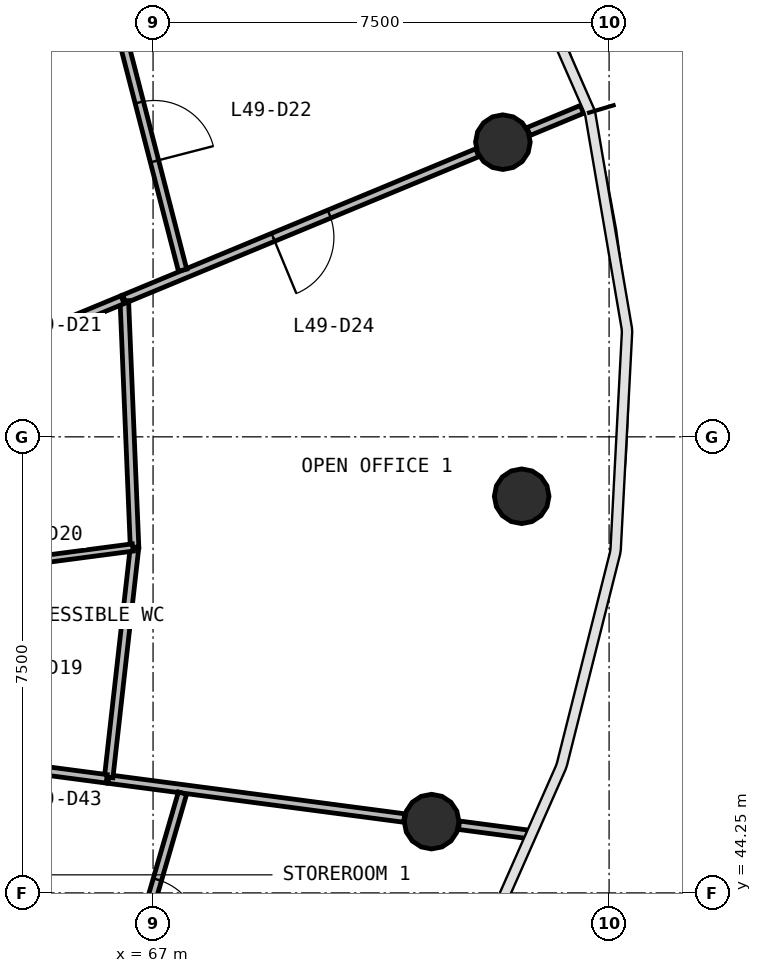
"""IFC4 building model, lengths in metres.
Left out: names, types, materials, properties, quantities, classifications, styles, units other than length and angle.
Written with IfcOpenShell. Run it as: python <this file> out.ifc"""

import sys

from ifc_helpers import new_model, si_unit, direction, frame, frame_2d, origin, origin_2d, place, context, subcontext, project, spatial, rectangle, circle, extrude, source, transform, mapped, element, fill, save


model = new_model("IFC4")
c1 = context("Model", 3, precision=1e-05, world=origin(), true_north=direction((0.0, 1.0)))
c2 = subcontext(c1, "Body", "Model", "MODEL_VIEW")
j1 = project(units=[si_unit("LENGTHUNIT", "METRE"), si_unit("PLANEANGLEUNIT", "RADIAN")], contexts=[c1])
p1 = place(None, origin())
s1 = spatial("IfcSite", under=j1, at=p1, CompositionType="ELEMENT")
p2 = place(p1, origin())
s2 = spatial("IfcBuilding", under=s1, at=p2, CompositionType="ELEMENT")
p3 = place(p2, frame((0.0, 0.0, 203.3)))
s3 = spatial("IfcBuildingStorey", under=s2, at=p3, CompositionType="ELEMENT", Elevation=203.3)
m1 = source(origin(), c2, "Body", "SweptSolid", [
    extrude(circle(Radius=0.45, at=origin_2d()), origin(), (0.0, 0.0, 1.0), 3.9),
])
for number, where, z_axis, x_axis in (
    (1, (73.062, 50.773, 0.0), (0.0, 0.0, 1.0), (1.0, 0.0, 0.0)),
    (2, (72.753, 56.596, 0.0), (0.0, 0.0, 1.0), (1.0, 0.0, 0.0)),
    (3, (71.581, 45.422, 0.0), (0.0, 0.0, 1.0), (1.0, 0.0, 0.0)),
):
    element("IfcColumn", number, at=place(p3, frame(where, z_axis=z_axis, x_axis=x_axis)), inside=s3, PredefinedType="COLUMN", context=c2, shape_type="MappedRepresentation", body=[
        mapped(m1, transform((0.0, 0.0, 0.0), scale=1.0)),
    ])
p4 = place(p3, frame((72.333, 56.422, 0.0), z_axis=(0.0, 0.0, 1.0), x_axis=(-0.92388853292, -0.382661702733, 0.0)))
e4 = element("IfcWall", 4, at=p4, inside=s3, PredefinedType="PARTITIONING", context=c2, shape_type="SweptSolid", body=[
    extrude(rectangle(XDim=6.285, YDim=0.14, at=frame_2d((3.143, 0.0))), origin(), (0.0, 0.0, 1.0), 2.88),
])
p5 = place(p4, frame((2.635, 0.0, 0.0)))
e5 = element("IfcOpeningElement", 5, at=p5, cuts=e4, PredefinedType="OPENING", context=c2, shape_type="SweptSolid", body=[
    extrude(rectangle(XDim=1.0, YDim=2.1, at=frame_2d((0.5, 1.05))), frame((0.0, 0.08, 0.0), z_axis=(0.0, -1.0, 0.0), x_axis=(1.0, 0.0, 0.0)), (0.0, 0.0, 1.0), 0.16),
])
p6 = place(p3, frame((66.267, 46.122, 0.0), z_axis=(0.0, 0.0, 1.0), x_axis=(0.991448195842, -0.130500861923, 0.0)))
e6 = element("IfcWall", 6, at=p6, inside=s3, PredefinedType="PARTITIONING", context=c2, shape_type="SweptSolid", body=[
    extrude(rectangle(XDim=4.905, YDim=0.14, at=frame_2d((2.453, 0.0))), origin(), (0.0, 0.0, 1.0), 2.88),
])
p7 = place(p3, frame((66.324, 58.991, 0.0), z_axis=(0.0, 0.0, 1.0), x_axis=(0.249819251726, -0.968292487561, 0.0)))
e7 = element("IfcWall", 7, at=p7, inside=s3, PredefinedType="PARTITIONING", context=c2, shape_type="SweptSolid", body=[
    extrude(rectangle(XDim=4.649, YDim=0.14, at=frame_2d((2.324, 0.0))), origin(), (0.0, 0.0, 1.0), 2.88),
])
p8 = place(p7, frame((1.799, 0.0, 0.0)))
e8 = element("IfcOpeningElement", 8, at=p8, cuts=e7, PredefinedType="OPENING", context=c2, shape_type="SweptSolid", body=[
    extrude(rectangle(XDim=1.0, YDim=2.1, at=frame_2d((0.5, 1.05))), frame((0.0, 0.08, 0.0), z_axis=(0.0, -1.0, 0.0), x_axis=(1.0, 0.0, 0.0)), (0.0, 0.0, 1.0), 0.16),
])
p9 = place(p3, frame((66.696, 49.935, 0.0), z_axis=(0.0, 0.0, 1.0), x_axis=(-0.041535399008, 0.999137032959, 0.0)))
e9 = element("IfcWall", 9, at=p9, inside=s3, PredefinedType="PARTITIONING", context=c2, shape_type="SweptSolid", body=[
    extrude(rectangle(XDim=4.056, YDim=0.14, at=frame_2d((2.028, 0.0))), origin(), (0.0, 0.0, 1.0), 2.88),
])
p10 = place(p3, frame((67.484, 45.891, 0.0), z_axis=(0.0, 0.0, 1.0), x_axis=(-0.279262901939, -0.960214679955, 0.0)))
e10 = element("IfcWall", 10, at=p10, inside=s3, PredefinedType="PARTITIONING", context=c2, shape_type="SweptSolid", body=[
    extrude(rectangle(XDim=3.931, YDim=0.14, at=frame_2d((1.965, 0.0))), origin(), (0.0, 0.0, 1.0), 2.88),
])
p11 = place(p10, frame((1.481, 0.0, 0.0)))
e11 = element("IfcOpeningElement", 11, at=p11, cuts=e10, PredefinedType="OPENING", context=c2, shape_type="SweptSolid", body=[
    extrude(rectangle(XDim=1.0, YDim=2.1, at=frame_2d((0.5, 1.05))), frame((0.0, 0.08, 0.0), z_axis=(0.0, -1.0, 0.0), x_axis=(1.0, 0.0, 0.0)), (0.0, 0.0, 1.0), 0.16),
])
p12 = place(p3, frame((66.271, 46.152, 0.0), z_axis=(0.0, 0.0, 1.0), x_axis=(0.111758070994, 0.993735444456, 0.0)))
e12 = element("IfcWall", 12, at=p12, inside=s3, PredefinedType="PARTITIONING", context=c2, shape_type="SweptSolid", body=[
    extrude(rectangle(XDim=3.777, YDim=0.14, at=frame_2d((1.889, 0.0))), origin(), (0.0, 0.0, 1.0), 2.88),
])
p13 = place(p3, frame((63.49, 52.759, 0.0), z_axis=(0.0, 0.0, 1.0), x_axis=(0.923862401464, 0.382724787753, 0.0)))
e13 = element("IfcWall", 13, at=p13, inside=s3, PredefinedType="PARTITIONING", context=c2, shape_type="SweptSolid", body=[
    extrude(rectangle(XDim=3.257, YDim=0.14, at=frame_2d((1.628, 0.0))), origin(), (0.0, 0.0, 1.0), 2.88),
])
p14 = place(p3, frame((63.49, 46.487, 0.0), z_axis=(0.0, 0.0, 1.0), x_axis=(0.991438994906, -0.13057074473, 0.0)))
e14 = element("IfcWall", 14, at=p14, inside=s3, PredefinedType="PARTITIONING", context=c2, shape_type="SweptSolid", body=[
    extrude(rectangle(XDim=2.771, YDim=0.14, at=frame_2d((1.385, 0.0))), origin(), (0.0, 0.0, 1.0), 2.88),
])
p15 = place(p3, frame((72.031, 45.363, 0.0), z_axis=(0.0, 0.0, 1.0), x_axis=(0.99143621724, -0.130591834141, 0.0)))
e15 = element("IfcWall", 15, at=p15, inside=s3, PredefinedType="PARTITIONING", context=c2, shape_type="SweptSolid", body=[
    extrude(rectangle(XDim=1.15, YDim=0.14, at=frame_2d((0.575, 0.0))), origin(), (0.0, 0.0, 1.0), 2.88),
])
p16 = place(p3, frame((73.174, 56.77, 0.0), z_axis=(0.0, 0.0, 1.0), x_axis=(0.923779659408, 0.38292445843, 0.0)))
e16 = element("IfcWall", 16, at=p16, inside=s3, PredefinedType="PARTITIONING", context=c2, shape_type="SweptSolid", body=[
    extrude(rectangle(XDim=0.954, YDim=0.14, at=frame_2d((0.477, 0.0))), origin(), (0.0, 0.0, 1.0), 2.88),
])
p17 = place(p3, frame((63.49, 49.513, 0.0), z_axis=(0.0, 0.0, 1.0), x_axis=(0.991442878973, 0.130541249168, 0.0)))
e17 = element("IfcWall", 17, at=p17, inside=s3, PredefinedType="PARTITIONING", context=c2, shape_type="SweptSolid", body=[
    extrude(rectangle(XDim=3.204, YDim=0.12, at=frame_2d((1.602, 0.0))), origin(), (0.0, 0.0, 1.0), 2.88),
])
m2 = source(origin(), c2, "Body", "SweptSolid", [
    extrude(rectangle(XDim=1.0, YDim=2.1, at=frame_2d((0.5, 1.05))), frame((0.0, 0.025, 0.0), z_axis=(0.0, -1.0, 0.0), x_axis=(1.0, 0.0, 0.0)), (0.0, 0.0, 1.0), 0.05),
])
p18 = place(p8, origin())
e18 = element("IfcDoor", 18, at=p18, inside=s3, OperationType="SINGLE_SWING_RIGHT", PredefinedType="DOOR", context=c2, shape_type="MappedRepresentation", body=[
    mapped(m2, transform((0.0, 0.0, 0.0), scale=1.0)),
])
fill(e8, e18)
p19 = place(p5, origin())
e19 = element("IfcDoor", 19, at=p19, inside=s3, OperationType="SINGLE_SWING_RIGHT", PredefinedType="DOOR", context=c2, shape_type="MappedRepresentation", body=[
    mapped(m2, transform((0.0, 0.0, 0.0), scale=1.0)),
])
fill(e5, e19)
p20 = place(p11, origin())
e20 = element("IfcDoor", 20, at=p20, inside=s3, OperationType="SINGLE_SWING_RIGHT", PredefinedType="DOOR", context=c2, shape_type="MappedRepresentation", body=[
    mapped(m2, transform((0.0, 0.0, 0.0), scale=1.0)),
])
fill(e11, e20)
save(model, sys.argv[1])
